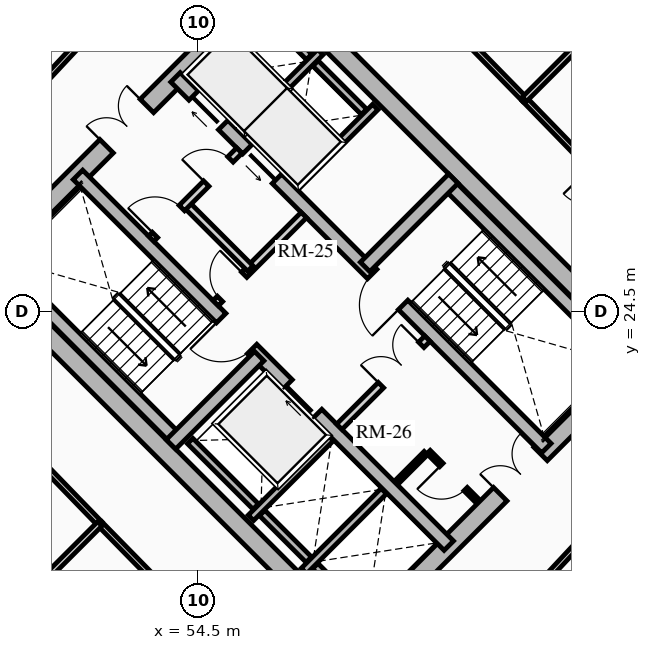
"""IFC4 building model, lengths in metres.
Left out: names, types, materials, properties, quantities, classifications, styles, units other than length and angle.
Written with IfcOpenShell. Run it as: python <this file> out.ifc"""

import sys

from ifc_helpers import new_model, si_unit, direction, frame, frame_2d, origin, place, context, subcontext, project, spatial, rectangle, extrude, source, transform, mapped, element, fill, save


model = new_model("IFC4")
c1 = context("Model", 3, precision=1e-05, world=origin(), true_north=direction((0.0, 1.0)))
c2 = subcontext(c1, "Body", "Model", "MODEL_VIEW")
j1 = project(units=[si_unit("LENGTHUNIT", "METRE"), si_unit("PLANEANGLEUNIT", "RADIAN")], contexts=[c1])
p1 = place(None, origin())
s1 = spatial("IfcSite", under=j1, at=p1, CompositionType="ELEMENT")
p2 = place(p1, origin())
s2 = spatial("IfcBuilding", under=s1, at=p2, CompositionType="ELEMENT")
p3 = place(p2, frame((0.0, 0.0, 42.37)))
s3 = spatial("IfcBuildingStorey", under=s2, at=p3, CompositionType="ELEMENT", Elevation=42.37)
for number, where, z_axis, x_axis in (
    (1, (58.773, 15.661, 0.0), (0.0, 0.0, 1.0), (-0.707, 0.707, 0.0)),
    (2, (66.339, 23.227, 0.0), (0.0, 0.0, 1.0), (-0.707, 0.707, 0.0)),
):
    element("IfcWall", number, at=place(p3, frame(where, z_axis=z_axis, x_axis=x_axis)), inside=s3, PredefinedType="SHEAR", context=c2, shape_type="SweptSolid", body=[
        extrude(rectangle(XDim=14.3, YDim=0.5, at=frame_2d((7.15, 0.0))), origin(), (0.0, 0.0, 1.0), 2.91),
    ])
p4 = place(p3, frame((58.596, 15.838, 0.0), z_axis=(0.0, 0.0, 1.0), x_axis=(0.707106781187, 0.707106781187, 0.0)))
e3 = element("IfcWall", 3, at=p4, inside=s3, PredefinedType="SHEAR", context=c2, shape_type="SweptSolid", body=[
    extrude(rectangle(XDim=10.7, YDim=0.5, at=frame_2d((5.35, 0.0))), origin(), (0.0, 0.0, 1.0), 2.91),
])
m1 = source(origin(), c2, "Body", "SweptSolid", [
    extrude(rectangle(XDim=1.5, YDim=2.02, at=frame_2d((0.75, 1.01))), frame((0.0, 0.26, 0.0), z_axis=(0.0, -1.0, 0.0), x_axis=(1.0, 0.0, 0.0)), (0.0, 0.0, 1.0), 0.52),
])
p5 = place(p4, frame((5.45, 0.0, 0.0)))
e4 = element("IfcOpeningElement", 4, at=p5, cuts=e3, PredefinedType="OPENING", context=c2, shape_type="MappedRepresentation", body=[
    mapped(m1, transform((0.0, 0.0, 0.0), x_axis=(1.0, 0.0, 0.0), y_axis=(0.0, 1.0, 0.0), z_axis=(0.0, 0.0, 1.0), scale=1.0)),
])
p6 = place(p3, frame((48.838, 25.596, 0.0), z_axis=(0.0, 0.0, 1.0), x_axis=(0.707106781187, 0.707106781187, 0.0)))
e5 = element("IfcWall", 5, at=p6, inside=s3, PredefinedType="SHEAR", context=c2, shape_type="SweptSolid", body=[
    extrude(rectangle(XDim=10.7, YDim=0.5, at=frame_2d((5.35, 0.0))), origin(), (0.0, 0.0, 1.0), 2.91),
])
p7 = place(p6, frame((4.6, 0.0, 0.0)))
e6 = element("IfcOpeningElement", 6, at=p7, cuts=e5, PredefinedType="OPENING", context=c2, shape_type="MappedRepresentation", body=[
    mapped(m1, transform((0.0, 0.0, 0.0), x_axis=(1.0, 0.0, 0.0), y_axis=(0.0, 1.0, 0.0), z_axis=(0.0, 0.0, 1.0), scale=1.0)),
])
p8 = place(p3, frame((61.096, 18.338, 0.0), z_axis=(0.0, 0.0, 1.0), x_axis=(-0.707106781187, 0.707106781187, 0.0)))
e7 = element("IfcWall", 7, at=p8, inside=s3, PredefinedType="SHEAR", context=c2, shape_type="SweptSolid", body=[
    extrude(rectangle(XDim=13.8, YDim=0.35, at=frame_2d((6.9, 0.0))), origin(), (0.0, 0.0, 1.0), 2.91),
])
m2 = source(origin(), c2, "Body", "SweptSolid", [
    extrude(rectangle(XDim=1.1, YDim=2.015, at=frame_2d((0.55, 1.007))), frame((0.0, 0.185, 0.0), z_axis=(0.0, -1.0, 0.0), x_axis=(1.0, 0.0, 0.0)), (0.0, 0.0, 1.0), 0.37),
])
p9 = place(p8, frame((4.9, 0.0, 0.0)))
e8 = element("IfcOpeningElement", 8, at=p9, cuts=e7, PredefinedType="OPENING", context=c2, shape_type="MappedRepresentation", body=[
    mapped(m2, transform((0.0, 0.0, 0.0), x_axis=(1.0, 0.0, 0.0), y_axis=(0.0, 1.0, 0.0), z_axis=(0.0, 0.0, 1.0), scale=1.0)),
])
m3 = source(origin(), c2, "Body", "SweptSolid", [
    extrude(rectangle(XDim=1.15, YDim=2.02, at=frame_2d((0.575, 1.01))), frame((0.0, 0.185, 0.0), z_axis=(0.0, -1.0, 0.0), x_axis=(1.0, 0.0, 0.0)), (0.0, 0.0, 1.0), 0.37),
])
p10 = place(p8, frame((7.32, 0.0, 0.0)))
e9 = element("IfcOpeningElement", 9, at=p10, cuts=e7, PredefinedType="OPENING", context=c2, shape_type="MappedRepresentation", body=[
    mapped(m3, transform((0.0, 0.0, 0.0), x_axis=(1.0, 0.0, 0.0), y_axis=(0.0, 1.0, 0.0), z_axis=(0.0, 0.0, 1.0), scale=1.0)),
])
p11 = place(p3, frame((63.662, 20.904, 0.0), z_axis=(0.0, 0.0, 1.0), x_axis=(-0.707106781187, 0.707106781187, 0.0)))
e10 = element("IfcWall", 10, at=p11, inside=s3, PredefinedType="SHEAR", context=c2, shape_type="SweptSolid", body=[
    extrude(rectangle(XDim=13.8, YDim=0.35, at=frame_2d((6.9, 0.0))), origin(), (0.0, 0.0, 1.0), 2.91),
])
p12 = place(p11, frame((10.025, 0.0, 0.0)))
e11 = element("IfcOpeningElement", 11, at=p12, cuts=e10, PredefinedType="OPENING", context=c2, shape_type="MappedRepresentation", body=[
    mapped(m2, transform((0.0, 0.0, 0.0), x_axis=(1.0, 0.0, 0.0), y_axis=(0.0, 1.0, 0.0), z_axis=(0.0, 0.0, 1.0), scale=1.0)),
])
p13 = place(p11, frame((12.025, 0.0, 0.0)))
e12 = element("IfcOpeningElement", 12, at=p13, cuts=e10, PredefinedType="OPENING", context=c2, shape_type="MappedRepresentation", body=[
    mapped(m2, transform((0.0, 0.0, 0.0), x_axis=(1.0, 0.0, 0.0), y_axis=(0.0, 1.0, 0.0), z_axis=(0.0, 0.0, 1.0), scale=1.0)),
])
p14 = place(p11, frame((5.33, 0.0, 0.0)))
e13 = element("IfcOpeningElement", 13, at=p14, cuts=e10, PredefinedType="OPENING", context=c2, shape_type="MappedRepresentation", body=[
    mapped(m3, transform((0.0, 0.0, 0.0), x_axis=(1.0, 0.0, 0.0), y_axis=(0.0, 1.0, 0.0), z_axis=(0.0, 0.0, 1.0), scale=1.0)),
])
p15 = place(p3, frame((53.922, 21.141, 0.0), z_axis=(0.0, 0.0, 1.0), x_axis=(-0.707106781187, 0.707106781187, 0.0)))
e14 = element("IfcWall", 14, at=p15, inside=s3, PredefinedType="SHEAR", context=c2, shape_type="SweptSolid", body=[
    extrude(rectangle(XDim=6.745, YDim=0.35, at=frame_2d((3.373, 0.0))), origin(), (0.0, 0.0, 1.0), 2.91),
])
p16 = place(p3, frame((53.784, 21.003, 0.0), z_axis=(0.0, 0.0, 1.0), x_axis=(0.707106781187, 0.707106781187, 0.0)))
e15 = element("IfcWall", 15, at=p16, inside=s3, PredefinedType="SHEAR", context=c2, shape_type="SweptSolid", body=[
    extrude(rectangle(XDim=3.285, YDim=0.35, at=frame_2d((1.643, 0.0))), origin(), (0.0, 0.0, 1.0), 2.91),
])
p17 = place(p3, frame((65.847, 23.089, 0.0), z_axis=(0.0, 0.0, 1.0), x_axis=(-0.707106781187, 0.707106781187, 0.0)))
e16 = element("IfcWall", 16, at=p17, inside=s3, PredefinedType="SHEAR", context=c2, shape_type="SweptSolid", body=[
    extrude(rectangle(XDim=6.745, YDim=0.35, at=frame_2d((3.373, 0.0))), origin(), (0.0, 0.0, 1.0), 2.91),
])
p18 = place(p3, frame((58.893, 25.674, 0.0), z_axis=(0.0, 0.0, 1.0), x_axis=(0.707106781187, 0.707106781187, 0.0)))
e17 = element("IfcWall", 17, at=p18, inside=s3, PredefinedType="SHEAR", context=c2, shape_type="SweptSolid", body=[
    extrude(rectangle(XDim=3.285, YDim=0.35, at=frame_2d((1.643, 0.0))), origin(), (0.0, 0.0, 1.0), 2.91),
])
p19 = place(p3, frame((55.888, 19.069, 0.0), z_axis=(0.0, 0.0, 1.0), x_axis=(0.707106781187, 0.707106781187, 0.0)))
e18 = element("IfcWall", 18, at=p19, inside=s3, PredefinedType="SHEAR", context=c2, shape_type="SweptSolid", body=[
    extrude(rectangle(XDim=2.97, YDim=0.2, at=frame_2d((1.485, 0.0))), origin(), (0.0, 0.0, 1.0), 2.91),
])
p20 = place(p3, frame((56.015, 19.366, 0.0), z_axis=(0.0, 0.0, 1.0), x_axis=(-0.707106781187, 0.707106781187, 0.0)))
e19 = element("IfcWall", 19, at=p20, inside=s3, PredefinedType="SHEAR", context=c2, shape_type="SweptSolid", body=[
    extrude(rectangle(XDim=2.44, YDim=0.2, at=frame_2d((1.22, 0.0))), origin(), (0.0, 0.0, 1.0), 2.91),
])
p21 = place(p3, frame((57.284, 17.673, 0.0), z_axis=(0.0, 0.0, 1.0), x_axis=(0.707147878904, 0.70706568108, 0.0)))
e20 = element("IfcWall", 20, at=p21, inside=s3, PredefinedType="SHEAR", context=c2, shape_type="SweptSolid", body=[
    extrude(rectangle(XDim=2.97, YDim=0.2, at=frame_2d((1.485, 0.0))), origin(), (0.0, 0.0, 1.0), 2.91),
])
p22 = place(p3, frame((57.412, 17.97, 0.0), z_axis=(0.0, 0.0, 1.0), x_axis=(-0.707106781187, 0.707106781187, 0.0)))
e21 = element("IfcWall", 21, at=p22, inside=s3, PredefinedType="SHEAR", context=c2, shape_type="SweptSolid", body=[
    extrude(rectangle(XDim=1.735, YDim=0.2, at=frame_2d((0.867, 0.0))), origin(), (0.0, 0.0, 1.0), 2.91),
])
p23 = place(p3, frame((58.737, 16.644, 0.0), z_axis=(0.0, 0.0, 1.0), x_axis=(-0.707032117043, 0.707181437447, 0.0)))
e22 = element("IfcWall", 22, at=p23, inside=s3, PredefinedType="SHEAR", context=c2, shape_type="SweptSolid", body=[
    extrude(rectangle(XDim=1.635, YDim=0.2, at=frame_2d((0.817, 0.0))), origin(), (0.0, 0.0, 1.0), 2.91),
])
p24 = place(p3, frame((57.062, 27.781, 0.0), z_axis=(0.0, 0.0, 1.0), x_axis=(0.707106781187, 0.707106781187, 0.0)))
e23 = element("IfcWall", 23, at=p24, inside=s3, PredefinedType="SHEAR", context=c2, shape_type="SweptSolid", body=[
    extrude(rectangle(XDim=2.97, YDim=0.2, at=frame_2d((1.485, 0.0))), origin(), (0.0, 0.0, 1.0), 2.91),
])
p25 = place(p3, frame((55.615, 29.227, 0.0), z_axis=(0.0, 0.0, 1.0), x_axis=(0.707147878904, 0.70706568108, 0.0)))
e24 = element("IfcWall", 24, at=p25, inside=s3, PredefinedType="SHEAR", context=c2, shape_type="SweptSolid", body=[
    extrude(rectangle(XDim=2.97, YDim=0.2, at=frame_2d((1.485, 0.0))), origin(), (0.0, 0.0, 1.0), 2.91),
])
p26 = place(p3, frame((58.865, 29.754, 0.0), z_axis=(0.0, 0.0, 1.0), x_axis=(-0.707174411312, 0.707039144592, 0.0)))
e25 = element("IfcWall", 25, at=p26, inside=s3, PredefinedType="SHEAR", context=c2, shape_type="SweptSolid", body=[
    extrude(rectangle(XDim=1.805, YDim=0.2, at=frame_2d((0.902, 0.0))), origin(), (0.0, 0.0, 1.0), 2.91),
])
p27 = place(p3, frame((57.419, 31.2, 0.0), z_axis=(0.0, 0.0, 1.0), x_axis=(-0.707032117043, 0.707181437447, 0.0)))
e26 = element("IfcWall", 26, at=p27, inside=s3, PredefinedType="SHEAR", context=c2, shape_type="SweptSolid", body=[
    extrude(rectangle(XDim=1.635, YDim=0.2, at=frame_2d((0.817, 0.0))), origin(), (0.0, 0.0, 1.0), 2.91),
])
p28 = place(p3, frame((58.214, 21.467, 0.0), z_axis=(0.0, 0.0, 1.0), x_axis=(0.707106781187, 0.707106781187, 0.0)))
e27 = element("IfcWall", 27, at=p28, inside=s3, PredefinedType="PARTITIONING", context=c2, shape_type="SweptSolid", body=[
    extrude(rectangle(XDim=3.28, YDim=0.2, at=frame_2d((1.64, 0.0))), origin(), (0.0, 0.0, 1.0), 2.635),
])
m4 = source(origin(), c2, "Body", "SweptSolid", [
    extrude(rectangle(XDim=1.5, YDim=2.02, at=frame_2d((0.75, 1.01))), frame((0.0, 0.11, 0.0), z_axis=(0.0, -1.0, 0.0), x_axis=(1.0, 0.0, 0.0)), (0.0, 0.0, 1.0), 0.22),
])
p29 = place(p28, frame((1.55, 0.0, 0.0)))
e28 = element("IfcOpeningElement", 28, at=p29, cuts=e27, PredefinedType="OPENING", context=c2, shape_type="MappedRepresentation", body=[
    mapped(m4, transform((0.0, 0.0, 0.0), x_axis=(1.0, 0.0, 0.0), y_axis=(0.0, 1.0, 0.0), z_axis=(0.0, 0.0, 1.0), scale=1.0)),
])
p30 = place(p3, frame((54.961, 24.719, 0.0), z_axis=(0.0, 0.0, 1.0), x_axis=(0.707106781187, 0.707106781187, 0.0)))
e29 = element("IfcWall", 29, at=p30, inside=s3, PredefinedType="PARTITIONING", context=c2, shape_type="SweptSolid", body=[
    extrude(rectangle(XDim=3.28, YDim=0.2, at=frame_2d((1.64, 0.0))), origin(), (0.0, 0.0, 1.0), 2.635),
])
m5 = source(origin(), c2, "Body", "SweptSolid", [
    extrude(rectangle(XDim=0.9, YDim=2.005, at=frame_2d((0.45, 1.002))), frame((0.0, 0.11, 0.0), z_axis=(0.0, -1.0, 0.0), x_axis=(1.0, 0.0, 0.0)), (0.0, 0.0, 1.0), 0.22),
])
p31 = place(p30, frame((0.16, 0.0, 0.0)))
e30 = element("IfcOpeningElement", 30, at=p31, cuts=e29, PredefinedType="OPENING", context=c2, shape_type="MappedRepresentation", body=[
    mapped(m5, transform((0.0, 0.0, 0.0), x_axis=(1.0, 0.0, 0.0), y_axis=(0.0, 1.0, 0.0), z_axis=(0.0, 0.0, 1.0), scale=1.0)),
])
p32 = place(p3, frame((55.874, 25.631, 0.0), z_axis=(0.0, 0.0, 1.0), x_axis=(-0.707157639372, 0.707055919343, 0.0)))
e31 = element("IfcWall", 31, at=p32, inside=s3, PredefinedType="PARTITIONING", context=c2, shape_type="SweptSolid", body=[
    extrude(rectangle(XDim=2.4, YDim=0.2, at=frame_2d((1.2, 0.0))), origin(), (0.0, 0.0, 1.0), 2.635),
])
p33 = place(p3, frame((53.264, 26.416, 0.0), z_axis=(0.0, 0.0, 1.0), x_axis=(0.707106781187, 0.707106781187, 0.0)))
e32 = element("IfcWall", 32, at=p33, inside=s3, PredefinedType="PARTITIONING", context=c2, shape_type="SweptSolid", body=[
    extrude(rectangle(XDim=3.28, YDim=0.2, at=frame_2d((1.64, 0.0))), origin(), (0.0, 0.0, 1.0), 2.635),
])
m6 = source(origin(), c2, "Body", "SweptSolid", [
    extrude(rectangle(XDim=1.0, YDim=2.015, at=frame_2d((0.5, 1.007))), frame((0.0, 0.11, 0.0), z_axis=(0.0, -1.0, 0.0), x_axis=(1.0, 0.0, 0.0)), (0.0, 0.0, 1.0), 0.22),
])
p34 = place(p33, frame((0.14, 0.0, 0.0)))
e33 = element("IfcOpeningElement", 33, at=p34, cuts=e32, PredefinedType="OPENING", context=c2, shape_type="MappedRepresentation", body=[
    mapped(m6, transform((0.0, 0.0, 0.0), x_axis=(1.0, 0.0, 0.0), y_axis=(0.0, 1.0, 0.0), z_axis=(0.0, 0.0, 1.0), scale=1.0)),
])
p35 = place(p33, frame((2.05, 0.0, 0.0)))
e34 = element("IfcOpeningElement", 34, at=p35, cuts=e32, PredefinedType="OPENING", context=c2, shape_type="MappedRepresentation", body=[
    mapped(m5, transform((0.0, 0.0, 0.0), x_axis=(1.0, 0.0, 0.0), y_axis=(0.0, 1.0, 0.0), z_axis=(0.0, 0.0, 1.0), scale=1.0)),
])
p36 = place(p3, frame((61.835, 19.529, 0.0), z_axis=(0.0, 0.0, 1.0), x_axis=(-0.707174592913, 0.707038962956, 0.0)))
e35 = element("IfcWall", 35, at=p36, inside=s3, PredefinedType="PARTITIONING", context=c2, shape_type="SweptSolid", body=[
    extrude(rectangle(XDim=1.8, YDim=0.125, at=frame_2d((0.9, 0.0))), origin(), (0.0, 0.0, 1.0), 2.635),
])
m7 = source(origin(), c2, "Body", "SweptSolid", [
    extrude(rectangle(XDim=0.9, YDim=2.005, at=frame_2d((0.45, 1.002))), frame((0.0, 0.073, 0.0), z_axis=(0.0, -1.0, 0.0), x_axis=(1.0, 0.0, 0.0)), (0.0, 0.0, 1.0), 0.145),
])
p37 = place(p36, frame((0.42, 0.0, 0.0)))
e36 = element("IfcOpeningElement", 36, at=p37, cuts=e35, PredefinedType="OPENING", context=c2, shape_type="MappedRepresentation", body=[
    mapped(m7, transform((0.0, 0.0, 0.0), x_axis=(1.0, 0.0, 0.0), y_axis=(0.0, 1.0, 0.0), z_axis=(0.0, 0.0, 1.0), scale=1.0)),
])
p38 = place(p3, frame((59.713, 19.996, 0.0), z_axis=(0.0, 0.0, 1.0), x_axis=(0.707217726, 0.706995818963, 0.0)))
e37 = element("IfcWall", 37, at=p38, inside=s3, PredefinedType="PARTITIONING", context=c2, shape_type="SweptSolid", body=[
    extrude(rectangle(XDim=1.1, YDim=0.125, at=frame_2d((0.55, 0.0))), origin(), (0.0, 0.0, 1.0), 2.635),
])
p39 = place(p3, frame((63.086, 30.086, 0.0), z_axis=(0.0, 0.0, 1.0), x_axis=(-0.699075897379, 0.715047473741, 0.0)))
e38 = element("IfcWall", 38, at=p39, inside=s3, PredefinedType="PARTITIONING", context=c2, shape_type="SweptSolid", body=[
    extrude(rectangle(XDim=6.114, YDim=0.15, at=frame_2d((3.057, 0.0))), origin(), (0.0, 0.0, 1.0), 2.159),
])
p40 = place(p3, frame((52.043, 32.28, 0.0), z_axis=(0.0, 0.0, 1.0), x_axis=(-0.682606081633, -0.730786519661, 0.0)))
e39 = element("IfcWall", 39, at=p40, inside=s3, PredefinedType="PARTITIONING", context=c2, shape_type="SweptSolid", body=[
    extrude(rectangle(XDim=6.527, YDim=0.15, at=frame_2d((3.263, 0.0))), origin(), (0.0, 0.0, 1.0), 2.159),
])
p41 = place(p3, frame((47.706, 23.253, 0.0), z_axis=(0.0, 0.0, 1.0), x_axis=(0.696179266346, -0.717867974707, 0.0)))
e40 = element("IfcWall", 40, at=p41, inside=s3, PredefinedType="PARTITIONING", context=c2, shape_type="SweptSolid", body=[
    extrude(rectangle(XDim=6.045, YDim=0.15, at=frame_2d((3.022, 0.0))), origin(), (0.0, 0.0, 1.0), 2.635),
])
m8 = source(origin(), c2, "Body", "SweptSolid", [
    extrude(rectangle(XDim=1.05, YDim=2.015, at=frame_2d((0.525, 1.007))), frame((0.0, 0.085, 0.0), z_axis=(0.0, -1.0, 0.0), x_axis=(1.0, 0.0, 0.0)), (0.0, 0.0, 1.0), 0.17),
])
p42 = place(p41, frame((2.497, 0.0, 0.0)))
e41 = element("IfcOpeningElement", 41, at=p42, cuts=e40, PredefinedType="OPENING", context=c2, shape_type="MappedRepresentation", body=[
    mapped(m8, transform((0.0, 0.0, 0.0), x_axis=(1.0, 0.0, 0.0), y_axis=(0.0, 1.0, 0.0), z_axis=(0.0, 0.0, 1.0), scale=1.0)),
])
p43 = place(p3, frame((51.914, 18.914, 0.0), z_axis=(0.0, 0.0, 1.0), x_axis=(0.699999313799, -0.714143515465, 0.0)))
e42 = element("IfcWall", 42, at=p43, inside=s3, PredefinedType="PARTITIONING", context=c2, shape_type="SweptSolid", body=[
    extrude(rectangle(XDim=6.162, YDim=0.15, at=frame_2d((3.081, 0.0))), origin(), (0.0, 0.0, 1.0), 2.159),
])
p44 = place(p3, frame((62.903, 16.667, 0.0), z_axis=(0.0, 0.0, 1.0), x_axis=(0.682371947497, 0.731005147225, 0.0)))
e43 = element("IfcWall", 43, at=p44, inside=s3, PredefinedType="PARTITIONING", context=c2, shape_type="SweptSolid", body=[
    extrude(rectangle(XDim=6.642, YDim=0.15, at=frame_2d((3.321, 0.0))), origin(), (0.0, 0.0, 1.0), 2.159),
])
p45 = place(p3, frame((67.27, 25.78, 0.0), z_axis=(0.0, 0.0, 1.0), x_axis=(-0.696847842907, 0.717218992942, 0.0)))
e44 = element("IfcWall", 44, at=p45, inside=s3, PredefinedType="PARTITIONING", context=c2, shape_type="SweptSolid", body=[
    extrude(rectangle(XDim=6.004, YDim=0.15, at=frame_2d((3.002, 0.0))), origin(), (0.0, 0.0, 1.0), 2.635),
])
m9 = source(origin(), c2, "Body", "SweptSolid", [
    extrude(rectangle(XDim=1.0, YDim=2.015, at=frame_2d((0.5, 1.007))), frame((0.0, 0.085, 0.0), z_axis=(0.0, -1.0, 0.0), x_axis=(1.0, 0.0, 0.0)), (0.0, 0.0, 1.0), 0.17),
])
p46 = place(p45, frame((2.502, 0.0, 0.0)))
e45 = element("IfcOpeningElement", 45, at=p46, cuts=e44, PredefinedType="OPENING", context=c2, shape_type="MappedRepresentation", body=[
    mapped(m9, transform((0.0, 0.0, 0.0), x_axis=(1.0, 0.0, 0.0), y_axis=(0.0, 1.0, 0.0), z_axis=(0.0, 0.0, 1.0), scale=1.0)),
])
for number, where, z_axis, x_axis in (
    (46, (63.086, 30.086, 0.0), (0.0, 0.0, 1.0), (0.707, 0.707, 0.0)),
    (47, (51.914, 18.914, 0.0), (0.0, 0.0, 1.0), (-0.707, -0.707, 0.0)),
):
    element("IfcWall", number, at=place(p3, frame(where, z_axis=z_axis, x_axis=x_axis)), inside=s3, PredefinedType="PARTITIONING", context=c2, shape_type="SweptSolid", body=[
        extrude(rectangle(XDim=7.579, YDim=0.16, at=frame_2d((3.79, 0.0))), origin(), (0.0, 0.0, 1.0), 2.073),
    ])
m10 = source(origin(), c2, "Body", "SweptSolid", [
    extrude(rectangle(XDim=1.1, YDim=2.015, at=frame_2d((0.55, 1.007))), frame((0.0, 0.025, 0.0), z_axis=(0.0, -1.0, 0.0), x_axis=(1.0, 0.0, 0.0)), (0.0, 0.0, 1.0), 0.05),
])
p47 = place(p9, origin())
e48 = element("IfcDoor", 48, at=p47, inside=s3, OperationType="SLIDING_TO_RIGHT", PredefinedType="DOOR", context=c2, shape_type="MappedRepresentation", body=[
    mapped(m10, transform((0.0, 0.0, 0.0), x_axis=(1.0, 0.0, 0.0), y_axis=(0.0, 1.0, 0.0), z_axis=(0.0, 0.0, 1.0), scale=1.0)),
])
fill(e8, e48)
p48 = place(p12, origin())
e49 = element("IfcDoor", 49, at=p48, inside=s3, OperationType="SLIDING_TO_LEFT", PredefinedType="DOOR", context=c2, shape_type="MappedRepresentation", body=[
    mapped(m10, transform((0.0, 0.0, 0.0), x_axis=(1.0, 0.0, 0.0), y_axis=(0.0, 1.0, 0.0), z_axis=(0.0, 0.0, 1.0), scale=1.0)),
])
fill(e11, e49)
p49 = place(p13, origin())
e50 = element("IfcDoor", 50, at=p49, inside=s3, OperationType="SLIDING_TO_RIGHT", PredefinedType="DOOR", context=c2, shape_type="MappedRepresentation", body=[
    mapped(m10, transform((0.0, 0.0, 0.0), x_axis=(1.0, 0.0, 0.0), y_axis=(0.0, 1.0, 0.0), z_axis=(0.0, 0.0, 1.0), scale=1.0)),
])
fill(e12, e50)
m11 = source(origin(), c2, "Body", "SweptSolid", [
    extrude(rectangle(XDim=1.15, YDim=2.02, at=frame_2d((0.575, 1.01))), frame((0.0, 0.025, 0.0), z_axis=(0.0, -1.0, 0.0), x_axis=(1.0, 0.0, 0.0)), (0.0, 0.0, 1.0), 0.05),
])
p50 = place(p10, origin())
e51 = element("IfcDoor", 51, at=p50, inside=s3, OperationType="SINGLE_SWING_RIGHT", PredefinedType="DOOR", context=c2, shape_type="MappedRepresentation", body=[
    mapped(m11, transform((0.0, 0.0, 0.0), x_axis=(1.0, 0.0, 0.0), y_axis=(0.0, 1.0, 0.0), z_axis=(0.0, 0.0, 1.0), scale=1.0)),
])
fill(e9, e51)
p51 = place(p14, origin())
e52 = element("IfcDoor", 52, at=p51, inside=s3, OperationType="SINGLE_SWING_LEFT", PredefinedType="DOOR", context=c2, shape_type="MappedRepresentation", body=[
    mapped(m11, transform((0.0, 0.0, 0.0), x_axis=(1.0, 0.0, 0.0), y_axis=(0.0, 1.0, 0.0), z_axis=(0.0, 0.0, 1.0), scale=1.0)),
])
fill(e13, e52)
m12 = source(origin(), c2, "Body", "SweptSolid", [
    extrude(rectangle(XDim=1.5, YDim=2.02, at=frame_2d((0.75, 1.01))), frame((0.0, 0.025, 0.0), z_axis=(0.0, -1.0, 0.0), x_axis=(1.0, 0.0, 0.0)), (0.0, 0.0, 1.0), 0.05),
])
p52 = place(p7, origin())
e53 = element("IfcDoor", 53, at=p52, inside=s3, OperationType="DOUBLE_DOOR_SINGLE_SWING", PredefinedType="DOOR", context=c2, shape_type="MappedRepresentation", body=[
    mapped(m12, transform((0.0, 0.0, 0.0), x_axis=(1.0, 0.0, 0.0), y_axis=(0.0, 1.0, 0.0), z_axis=(0.0, 0.0, 1.0), scale=1.0)),
])
fill(e6, e53)
p53 = place(p5, origin())
e54 = element("IfcDoor", 54, at=p53, inside=s3, OperationType="DOUBLE_DOOR_SINGLE_SWING", PredefinedType="DOOR", context=c2, shape_type="MappedRepresentation", body=[
    mapped(m12, transform((0.0, 0.0, 0.0), x_axis=(1.0, 0.0, 0.0), y_axis=(0.0, 1.0, 0.0), z_axis=(0.0, 0.0, 1.0), scale=1.0)),
])
fill(e4, e54)
p54 = place(p29, origin())
e55 = element("IfcDoor", 55, at=p54, inside=s3, OperationType="DOUBLE_DOOR_SINGLE_SWING", PredefinedType="DOOR", context=c2, shape_type="MappedRepresentation", body=[
    mapped(m12, transform((0.0, 0.0, 0.0), x_axis=(1.0, 0.0, 0.0), y_axis=(0.0, 1.0, 0.0), z_axis=(0.0, 0.0, 1.0), scale=1.0)),
])
fill(e28, e55)
m13 = source(origin(), c2, "Body", "SweptSolid", [
    extrude(rectangle(XDim=0.9, YDim=2.005, at=frame_2d((0.45, 1.002))), frame((0.0, 0.025, 0.0), z_axis=(0.0, -1.0, 0.0), x_axis=(1.0, 0.0, 0.0)), (0.0, 0.0, 1.0), 0.05),
])
p55 = place(p31, origin())
e56 = element("IfcDoor", 56, at=p55, inside=s3, OperationType="SINGLE_SWING_RIGHT", PredefinedType="DOOR", context=c2, shape_type="MappedRepresentation", body=[
    mapped(m13, transform((0.0, 0.0, 0.0), x_axis=(1.0, 0.0, 0.0), y_axis=(0.0, 1.0, 0.0), z_axis=(0.0, 0.0, 1.0), scale=1.0)),
])
fill(e30, e56)
m14 = source(origin(), c2, "Body", "SweptSolid", [
    extrude(rectangle(XDim=1.0, YDim=2.015, at=frame_2d((0.5, 1.007))), frame((0.0, 0.025, 0.0), z_axis=(0.0, -1.0, 0.0), x_axis=(1.0, 0.0, 0.0)), (0.0, 0.0, 1.0), 0.05),
])
p56 = place(p34, origin())
e57 = element("IfcDoor", 57, at=p56, inside=s3, OperationType="SINGLE_SWING_LEFT", PredefinedType="DOOR", context=c2, shape_type="MappedRepresentation", body=[
    mapped(m14, transform((0.0, 0.0, 0.0), x_axis=(1.0, 0.0, 0.0), y_axis=(0.0, 1.0, 0.0), z_axis=(0.0, 0.0, 1.0), scale=1.0)),
])
fill(e33, e57)
p57 = place(p37, origin())
e58 = element("IfcDoor", 58, at=p57, inside=s3, OperationType="SINGLE_SWING_RIGHT", PredefinedType="DOOR", context=c2, shape_type="MappedRepresentation", body=[
    mapped(m13, transform((0.0, 0.0, 0.0), x_axis=(1.0, 0.0, 0.0), y_axis=(0.0, 1.0, 0.0), z_axis=(0.0, 0.0, 1.0), scale=1.0)),
])
fill(e36, e58)
p58 = place(p35, origin())
e59 = element("IfcDoor", 59, at=p58, inside=s3, OperationType="SINGLE_SWING_LEFT", PredefinedType="DOOR", context=c2, shape_type="MappedRepresentation", body=[
    mapped(m13, transform((0.0, 0.0, 0.0), x_axis=(1.0, 0.0, 0.0), y_axis=(0.0, 1.0, 0.0), z_axis=(0.0, 0.0, 1.0), scale=1.0)),
])
fill(e34, e59)
save(model, sys.argv[1])
